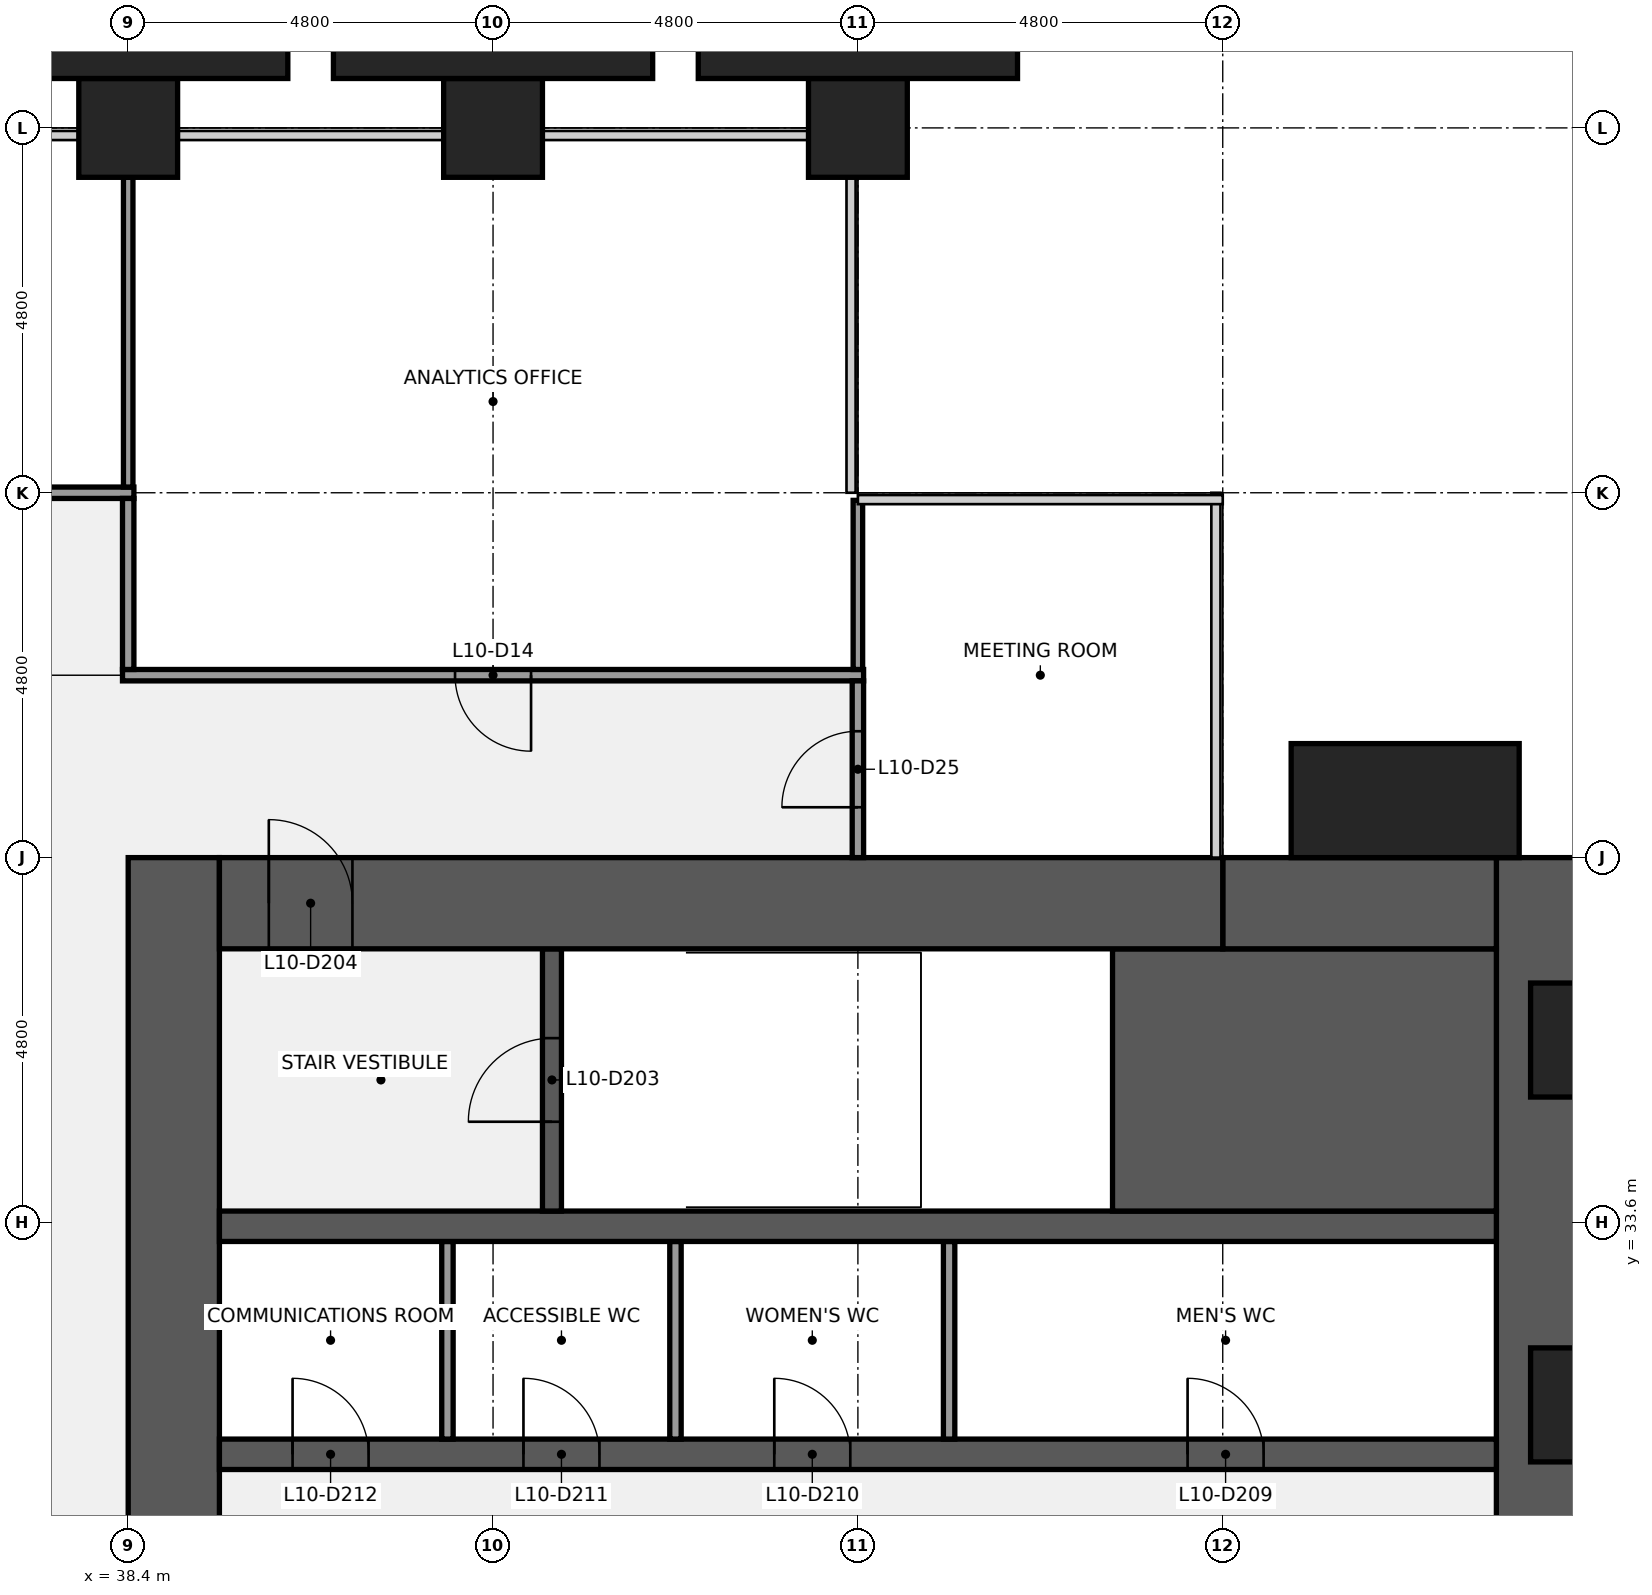
"""IFC4 building model, lengths in metres.
Left out: names, types, materials, properties, quantities, classifications, styles, units other than length and angle.
Written with IfcOpenShell. Run it as: python <this file> out.ifc"""

import sys

from ifc_helpers import new_model, si_unit, direction, frame, frame_2d, origin, origin_2d, place, context, subcontext, project, spatial, rectangle, extrude, element, fill, save


model = new_model("IFC4")
c1 = context("Model", 3, precision=1e-05, world=origin(), true_north=direction((0.0, 1.0)))
c2 = subcontext(c1, "Body", "Model", "MODEL_VIEW")
j1 = project(units=[si_unit("LENGTHUNIT", "METRE"), si_unit("PLANEANGLEUNIT", "RADIAN")], contexts=[c1])
p1 = place(None, origin())
s1 = spatial("IfcSite", under=j1, at=p1, CompositionType="ELEMENT")
p2 = place(p1, origin())
s2 = spatial("IfcBuilding", under=s1, at=p2, CompositionType="ELEMENT")
p3 = place(p2, frame((0.0, 0.0, 51.0)))
s3 = spatial("IfcBuildingStorey", under=s2, at=p3, CompositionType="ELEMENT", Elevation=51.0)
for number, where, z_axis, x_axis in (
    (1, (38.4, 48.0, 0.0), (0.0, 0.0, 1.0), (1.0, 0.0, 0.0)),
    (2, (43.2, 48.0, 0.0), (0.0, 0.0, 1.0), (1.0, 0.0, 0.0)),
    (3, (48.0, 48.0, 0.0), (0.0, 0.0, 1.0), (1.0, 0.0, 0.0)),
):
    element("IfcColumn", number, at=place(p3, frame(where, z_axis=z_axis, x_axis=x_axis)), inside=s3, PredefinedType="COLUMN", context=c2, shape_type="SweptSolid", body=[
        extrude(rectangle(XDim=1.3, YDim=1.3, at=origin_2d()), origin(), (0.0, 0.0, 1.0), 4.0),
    ])
p4 = place(p3, frame((57.0, 38.4, 0.0), z_axis=(0.0, 0.0, 1.0), x_axis=(0.0, -1.0, 0.0)))
e4 = element("IfcWall", 4, at=p4, inside=s3, PredefinedType="SHEAR", context=c2, shape_type="SweptSolid", body=[
    extrude(rectangle(XDim=28.8, YDim=1.2, at=frame_2d((14.4, 0.0))), origin(), (0.0, 0.0, 1.0), 3.84),
])
p5 = place(p4, frame((18.45, 0.0, 0.9)))
e5 = element("IfcOpeningElement", 5, at=p5, cuts=e4, PredefinedType="OPENING", context=c2, shape_type="SweptSolid", body=[
    extrude(rectangle(XDim=1.5, YDim=1.5, at=frame_2d((0.75, 0.75))), frame((0.0, 0.61, 0.0), z_axis=(0.0, -1.0, 0.0), x_axis=(1.0, 0.0, 0.0)), (0.0, 0.0, 1.0), 1.22),
])
p6 = place(p4, frame((8.85, 0.0, 0.9)))
e6 = element("IfcOpeningElement", 6, at=p6, cuts=e4, PredefinedType="OPENING", context=c2, shape_type="SweptSolid", body=[
    extrude(rectangle(XDim=1.5, YDim=1.5, at=frame_2d((0.75, 0.75))), frame((0.0, 0.61, 0.0), z_axis=(0.0, -1.0, 0.0), x_axis=(1.0, 0.0, 0.0)), (0.0, 0.0, 1.0), 1.22),
])
p7 = place(p3, frame((39.0, 9.6, 0.0), z_axis=(0.0, 0.0, 1.0), x_axis=(0.0, 1.0, 0.0)))
e7 = element("IfcWall", 7, at=p7, inside=s3, PredefinedType="SHEAR", context=c2, shape_type="SweptSolid", body=[
    extrude(rectangle(XDim=28.8, YDim=1.2, at=frame_2d((14.4, 0.0))), origin(), (0.0, 0.0, 1.0), 3.84),
])
p8 = place(p7, frame((8.7, 0.0, 0.0)))
e8 = element("IfcOpeningElement", 8, at=p8, cuts=e7, PredefinedType="OPENING", context=c2, shape_type="SweptSolid", body=[
    extrude(rectangle(XDim=1.8, YDim=2.1, at=frame_2d((0.9, 1.05))), frame((0.0, 0.61, 0.0), z_axis=(0.0, -1.0, 0.0), x_axis=(1.0, 0.0, 0.0)), (0.0, 0.0, 1.0), 1.22),
])
p9 = place(p7, frame((18.3, 0.0, 0.0)))
e9 = element("IfcOpeningElement", 9, at=p9, cuts=e7, PredefinedType="OPENING", context=c2, shape_type="SweptSolid", body=[
    extrude(rectangle(XDim=1.8, YDim=2.1, at=frame_2d((0.9, 1.05))), frame((0.0, 0.61, 0.0), z_axis=(0.0, -1.0, 0.0), x_axis=(1.0, 0.0, 0.0)), (0.0, 0.0, 1.0), 1.22),
])
p10 = place(p3, frame((39.6, 30.55, 0.0), z_axis=(0.0, 0.0, 1.0), x_axis=(1.0, 0.0, 0.0)))
e10 = element("IfcWall", 10, at=p10, inside=s3, PredefinedType="SHEAR", context=c2, shape_type="SweptSolid", body=[
    extrude(rectangle(XDim=16.8, YDim=0.4, at=frame_2d((8.4, 0.0))), origin(), (0.0, 0.0, 1.0), 3.84),
])
p11 = place(p10, frame((12.738, 0.0, 0.0)))
e11 = element("IfcOpeningElement", 11, at=p11, cuts=e10, PredefinedType="OPENING", context=c2, shape_type="SweptSolid", body=[
    extrude(rectangle(XDim=1.0, YDim=2.1, at=frame_2d((0.5, 1.05))), frame((0.0, 0.21, 0.0), z_axis=(0.0, -1.0, 0.0), x_axis=(1.0, 0.0, 0.0)), (0.0, 0.0, 1.0), 0.42),
])
p12 = place(p10, frame((7.3, 0.0, 0.0)))
e12 = element("IfcOpeningElement", 12, at=p12, cuts=e10, PredefinedType="OPENING", context=c2, shape_type="SweptSolid", body=[
    extrude(rectangle(XDim=1.0, YDim=2.1, at=frame_2d((0.5, 1.05))), frame((0.0, 0.21, 0.0), z_axis=(0.0, -1.0, 0.0), x_axis=(1.0, 0.0, 0.0)), (0.0, 0.0, 1.0), 0.42),
])
p13 = place(p10, frame((4.0, 0.0, 0.0)))
e13 = element("IfcOpeningElement", 13, at=p13, cuts=e10, PredefinedType="OPENING", context=c2, shape_type="SweptSolid", body=[
    extrude(rectangle(XDim=1.0, YDim=2.1, at=frame_2d((0.5, 1.05))), frame((0.0, 0.21, 0.0), z_axis=(0.0, -1.0, 0.0), x_axis=(1.0, 0.0, 0.0)), (0.0, 0.0, 1.0), 0.42),
])
p14 = place(p10, frame((0.962, 0.0, 0.0)))
e14 = element("IfcOpeningElement", 14, at=p14, cuts=e10, PredefinedType="OPENING", context=c2, shape_type="SweptSolid", body=[
    extrude(rectangle(XDim=1.0, YDim=2.1, at=frame_2d((0.5, 1.05))), frame((0.0, 0.21, 0.0), z_axis=(0.0, -1.0, 0.0), x_axis=(1.0, 0.0, 0.0)), (0.0, 0.0, 1.0), 0.42),
])
for number, where, z_axis, x_axis in (
    (15, (49.2, 30.75, 0.0), (0.0, 0.0, 1.0), (0.0, 1.0, 0.0)),
    (16, (45.6, 30.75, 0.0), (0.0, 0.0, 1.0), (0.0, 1.0, 0.0)),
    (17, (42.6, 30.75, 0.0), (0.0, 0.0, 1.0), (0.0, 1.0, 0.0)),
):
    element("IfcWall", number, at=place(p3, frame(where, z_axis=z_axis, x_axis=x_axis)), inside=s3, PredefinedType="PARTITIONING", context=c2, shape_type="SweptSolid", body=[
        extrude(rectangle(XDim=2.6, YDim=0.15, at=frame_2d((1.3, 0.0))), origin(), (0.0, 0.0, 1.0), 3.84),
    ])
p15 = place(p3, frame((39.6, 33.55, 0.0), z_axis=(0.0, 0.0, 1.0), x_axis=(1.0, 0.0, 0.0)))
e18 = element("IfcWall", 18, at=p15, inside=s3, PredefinedType="SHEAR", context=c2, shape_type="SweptSolid", body=[
    extrude(rectangle(XDim=16.8, YDim=0.4, at=frame_2d((8.4, 0.0))), origin(), (0.0, 0.0, 1.0), 3.84),
])
p16 = place(p3, frame((51.35, 35.475, 0.0), z_axis=(0.0, 0.0, 1.0), x_axis=(1.0, 0.0, 0.0)))
e19 = element("IfcWall", 19, at=p16, inside=s3, PredefinedType="SHEAR", context=c2, shape_type="SweptSolid", body=[
    extrude(rectangle(XDim=5.05, YDim=3.45, at=frame_2d((2.525, 0.0))), origin(), (0.0, 0.0, 1.0), 3.84),
])
p17 = place(p3, frame((43.975, 33.75, 0.0), z_axis=(0.0, 0.0, 1.0), x_axis=(0.0, 1.0, 0.0)))
e20 = element("IfcWall", 20, at=p17, inside=s3, PredefinedType="SHEAR", context=c2, shape_type="SweptSolid", body=[
    extrude(rectangle(XDim=3.45, YDim=0.25, at=frame_2d((1.725, 0.0))), origin(), (0.0, 0.0, 1.0), 3.84),
])
p18 = place(p17, frame((1.175, 0.0, 0.0)))
e21 = element("IfcOpeningElement", 21, at=p18, cuts=e20, PredefinedType="OPENING", context=c2, shape_type="SweptSolid", body=[
    extrude(rectangle(XDim=1.1, YDim=2.1, at=frame_2d((0.55, 1.05))), frame((0.0, 0.135, 0.0), z_axis=(0.0, -1.0, 0.0), x_axis=(1.0, 0.0, 0.0)), (0.0, 0.0, 1.0), 0.27),
])
p19 = place(p3, frame((52.8, 37.8, 0.0), z_axis=(0.0, 0.0, 1.0), x_axis=(1.0, 0.0, 0.0)))
e22 = element("IfcWall", 22, at=p19, inside=s3, PredefinedType="SHEAR", context=c2, shape_type="SweptSolid", body=[
    extrude(rectangle(XDim=3.6, YDim=1.2, at=frame_2d((1.8, 0.0))), origin(), (0.0, 0.0, 1.0), 3.84),
])
p20 = place(p3, frame((39.6, 37.8, 0.0), z_axis=(0.0, 0.0, 1.0), x_axis=(1.0, 0.0, 0.0)))
e23 = element("IfcWall", 23, at=p20, inside=s3, PredefinedType="SHEAR", context=c2, shape_type="SweptSolid", body=[
    extrude(rectangle(XDim=13.2, YDim=1.2, at=frame_2d((6.6, 0.0))), origin(), (0.0, 0.0, 1.0), 3.84),
])
p21 = place(p20, frame((0.65, 0.0, 0.0)))
e24 = element("IfcOpeningElement", 24, at=p21, cuts=e23, PredefinedType="OPENING", context=c2, shape_type="SweptSolid", body=[
    extrude(rectangle(XDim=1.1, YDim=2.1, at=frame_2d((0.55, 1.05))), frame((0.0, 0.61, 0.0), z_axis=(0.0, -1.0, 0.0), x_axis=(1.0, 0.0, 0.0)), (0.0, 0.0, 1.0), 1.22),
])
p22 = place(p3, frame((38.325, 40.8, 0.0), z_axis=(0.0, 0.0, 1.0), x_axis=(1.0, 0.0, 0.0)))
e25 = element("IfcWall", 25, at=p22, inside=s3, PredefinedType="PARTITIONING", context=c2, shape_type="SweptSolid", body=[
    extrude(rectangle(XDim=9.75, YDim=0.15, at=frame_2d((4.875, 0.0))), origin(), (0.0, 0.0, 1.0), 2.87),
])
p23 = place(p22, frame((4.375, 0.0, 0.0)))
e26 = element("IfcOpeningElement", 26, at=p23, cuts=e25, PredefinedType="OPENING", context=c2, shape_type="SweptSolid", body=[
    extrude(rectangle(XDim=1.0, YDim=2.1, at=frame_2d((0.5, 1.05))), frame((0.0, 0.085, 0.0), z_axis=(0.0, -1.0, 0.0), x_axis=(1.0, 0.0, 0.0)), (0.0, 0.0, 1.0), 0.17),
])
p24 = place(p3, frame((19.125, 43.2, 0.0), z_axis=(0.0, 0.0, 1.0), x_axis=(1.0, 0.0, 0.0)))
e27 = element("IfcWall", 27, at=p24, inside=s3, PredefinedType="PARTITIONING", context=c2, shape_type="SweptSolid", body=[
    extrude(rectangle(XDim=19.35, YDim=0.15, at=frame_2d((9.675, 0.0))), origin(), (0.0, 0.0, 1.0), 2.87),
])
p25 = place(p24, frame((4.375, 0.0, 0.0)))
e28 = element("IfcOpeningElement", 28, at=p25, cuts=e27, PredefinedType="OPENING", context=c2, shape_type="SweptSolid", body=[
    extrude(rectangle(XDim=1.0, YDim=2.1, at=frame_2d((0.5, 1.05))), frame((0.0, 0.085, 0.0), z_axis=(0.0, -1.0, 0.0), x_axis=(1.0, 0.0, 0.0)), (0.0, 0.0, 1.0), 0.17),
])
p26 = place(p24, frame((13.975, 0.0, 0.0)))
e29 = element("IfcOpeningElement", 29, at=p26, cuts=e27, PredefinedType="OPENING", context=c2, shape_type="SweptSolid", body=[
    extrude(rectangle(XDim=1.0, YDim=2.1, at=frame_2d((0.5, 1.05))), frame((0.0, 0.085, 0.0), z_axis=(0.0, -1.0, 0.0), x_axis=(1.0, 0.0, 0.0)), (0.0, 0.0, 1.0), 0.17),
])
p27 = place(p3, frame((38.4, 43.275, 0.0), z_axis=(0.0, 0.0, 1.0), x_axis=(0.0, 1.0, 0.0)))
e30 = element("IfcWall", 30, at=p27, inside=s3, PredefinedType="PARTITIONING", context=c2, shape_type="SweptSolid", body=[
    extrude(rectangle(XDim=4.075, YDim=0.125, at=frame_2d((2.038, 0.0))), origin(), (0.0, 0.0, 1.0), 2.87),
])
p28 = place(p3, frame((38.4, 40.875, 0.0), z_axis=(0.0, 0.0, 1.0), x_axis=(0.0, 1.0, 0.0)))
e31 = element("IfcWall", 31, at=p28, inside=s3, PredefinedType="PARTITIONING", context=c2, shape_type="SweptSolid", body=[
    extrude(rectangle(XDim=2.25, YDim=0.15, at=frame_2d((1.125, 0.0))), origin(), (0.0, 0.0, 1.0), 2.87),
])
p29 = place(p3, frame((48.0, 40.875, 0.0), z_axis=(0.0, 0.0, 1.0), x_axis=(0.0, 1.0, 0.0)))
e32 = element("IfcWall", 32, at=p29, inside=s3, PredefinedType="PARTITIONING", context=c2, shape_type="SweptSolid", body=[
    extrude(rectangle(XDim=2.225, YDim=0.125, at=frame_2d((1.113, 0.0))), origin(), (0.0, 0.0, 1.0), 2.87),
])
p30 = place(p3, frame((48.0, 38.4, 0.0), z_axis=(0.0, 0.0, 1.0), x_axis=(0.0, 1.0, 0.0)))
e33 = element("IfcWall", 33, at=p30, inside=s3, PredefinedType="PARTITIONING", context=c2, shape_type="SweptSolid", body=[
    extrude(rectangle(XDim=2.325, YDim=0.15, at=frame_2d((1.163, 0.0))), origin(), (0.0, 0.0, 1.0), 2.87),
])
p31 = place(p30, frame((0.663, 0.0, 0.0)))
e34 = element("IfcOpeningElement", 34, at=p31, cuts=e33, PredefinedType="OPENING", context=c2, shape_type="SweptSolid", body=[
    extrude(rectangle(XDim=1.0, YDim=2.1, at=frame_2d((0.5, 1.05))), frame((0.0, 0.085, 0.0), z_axis=(0.0, -1.0, 0.0), x_axis=(1.0, 0.0, 0.0)), (0.0, 0.0, 1.0), 0.17),
])
p32 = place(p3, frame((55.2, 39.15, 0.0), z_axis=(0.0, 0.0, 1.0), x_axis=(1.0, 0.0, 0.0)))
e35 = element("IfcColumn", 35, at=p32, inside=s3, PredefinedType="PILASTER", context=c2, shape_type="SweptSolid", body=[
    extrude(rectangle(XDim=3.0, YDim=1.5, at=origin_2d()), origin(), (0.0, 0.0, 1.0), 4.0),
])
for number, where, z_axis, x_axis in (
    (36, (38.4, 49.075, 0.0), (0.0, 0.0, 1.0), (1.0, 0.0, 0.0)),
    (37, (43.2, 49.075, 0.0), (0.0, 0.0, 1.0), (1.0, 0.0, 0.0)),
    (38, (48.0, 49.075, 0.0), (0.0, 0.0, 1.0), (1.0, 0.0, 0.0)),
):
    element("IfcColumn", number, at=place(p3, frame(where, z_axis=z_axis, x_axis=x_axis)), inside=s3, PredefinedType="PILASTER", context=c2, shape_type="SweptSolid", body=[
        extrude(rectangle(XDim=4.2, YDim=0.85, at=origin_2d()), origin(), (0.0, 0.0, 1.0), 4.0),
    ])
p33 = place(p18, origin())
e39 = element("IfcDoor", 39, at=p33, inside=s3, OperationType="SINGLE_SWING_LEFT", PredefinedType="DOOR", context=c2, shape_type="SweptSolid", body=[
    extrude(rectangle(XDim=1.1, YDim=2.1, at=frame_2d((0.55, 1.05))), frame((0.0, 0.025, 0.0), z_axis=(0.0, -1.0, 0.0), x_axis=(1.0, 0.0, 0.0)), (0.0, 0.0, 1.0), 0.05),
])
fill(e21, e39)
p34 = place(p21, origin())
e40 = element("IfcDoor", 40, at=p34, inside=s3, OperationType="SINGLE_SWING_LEFT", PredefinedType="DOOR", context=c2, shape_type="SweptSolid", body=[
    extrude(rectangle(XDim=1.1, YDim=2.1, at=frame_2d((0.55, 1.05))), frame((0.0, 0.025, 0.0), z_axis=(0.0, -1.0, 0.0), x_axis=(1.0, 0.0, 0.0)), (0.0, 0.0, 1.0), 0.05),
])
fill(e24, e40)
p35 = place(p11, origin())
e41 = element("IfcDoor", 41, at=p35, inside=s3, OperationType="SINGLE_SWING_LEFT", PredefinedType="DOOR", context=c2, shape_type="SweptSolid", body=[
    extrude(rectangle(XDim=1.0, YDim=2.1, at=frame_2d((0.5, 1.05))), frame((0.0, 0.025, 0.0), z_axis=(0.0, -1.0, 0.0), x_axis=(1.0, 0.0, 0.0)), (0.0, 0.0, 1.0), 0.05),
])
fill(e11, e41)
p36 = place(p12, origin())
e42 = element("IfcDoor", 42, at=p36, inside=s3, OperationType="SINGLE_SWING_LEFT", PredefinedType="DOOR", context=c2, shape_type="SweptSolid", body=[
    extrude(rectangle(XDim=1.0, YDim=2.1, at=frame_2d((0.5, 1.05))), frame((0.0, 0.025, 0.0), z_axis=(0.0, -1.0, 0.0), x_axis=(1.0, 0.0, 0.0)), (0.0, 0.0, 1.0), 0.05),
])
fill(e12, e42)
p37 = place(p13, origin())
e43 = element("IfcDoor", 43, at=p37, inside=s3, OperationType="SINGLE_SWING_LEFT", PredefinedType="DOOR", context=c2, shape_type="SweptSolid", body=[
    extrude(rectangle(XDim=1.0, YDim=2.1, at=frame_2d((0.5, 1.05))), frame((0.0, 0.025, 0.0), z_axis=(0.0, -1.0, 0.0), x_axis=(1.0, 0.0, 0.0)), (0.0, 0.0, 1.0), 0.05),
])
fill(e13, e43)
p38 = place(p14, origin())
e44 = element("IfcDoor", 44, at=p38, inside=s3, OperationType="SINGLE_SWING_LEFT", PredefinedType="DOOR", context=c2, shape_type="SweptSolid", body=[
    extrude(rectangle(XDim=1.0, YDim=2.1, at=frame_2d((0.5, 1.05))), frame((0.0, 0.025, 0.0), z_axis=(0.0, -1.0, 0.0), x_axis=(1.0, 0.0, 0.0)), (0.0, 0.0, 1.0), 0.05),
])
fill(e14, e44)
p39 = place(p23, origin())
e45 = element("IfcDoor", 45, at=p39, inside=s3, OperationType="SINGLE_SWING_RIGHT", PredefinedType="DOOR", context=c2, shape_type="SweptSolid", body=[
    extrude(rectangle(XDim=1.0, YDim=2.1, at=frame_2d((0.5, 1.05))), frame((0.0, 0.025, 0.0), z_axis=(0.0, -1.0, 0.0), x_axis=(1.0, 0.0, 0.0)), (0.0, 0.0, 1.0), 0.05),
])
fill(e26, e45)
p40 = place(p31, origin())
e46 = element("IfcDoor", 46, at=p40, inside=s3, OperationType="SINGLE_SWING_LEFT", PredefinedType="DOOR", context=c2, shape_type="SweptSolid", body=[
    extrude(rectangle(XDim=1.0, YDim=2.1, at=frame_2d((0.5, 1.05))), frame((0.0, 0.025, 0.0), z_axis=(0.0, -1.0, 0.0), x_axis=(1.0, 0.0, 0.0)), (0.0, 0.0, 1.0), 0.05),
])
fill(e34, e46)
save(model, sys.argv[1])
